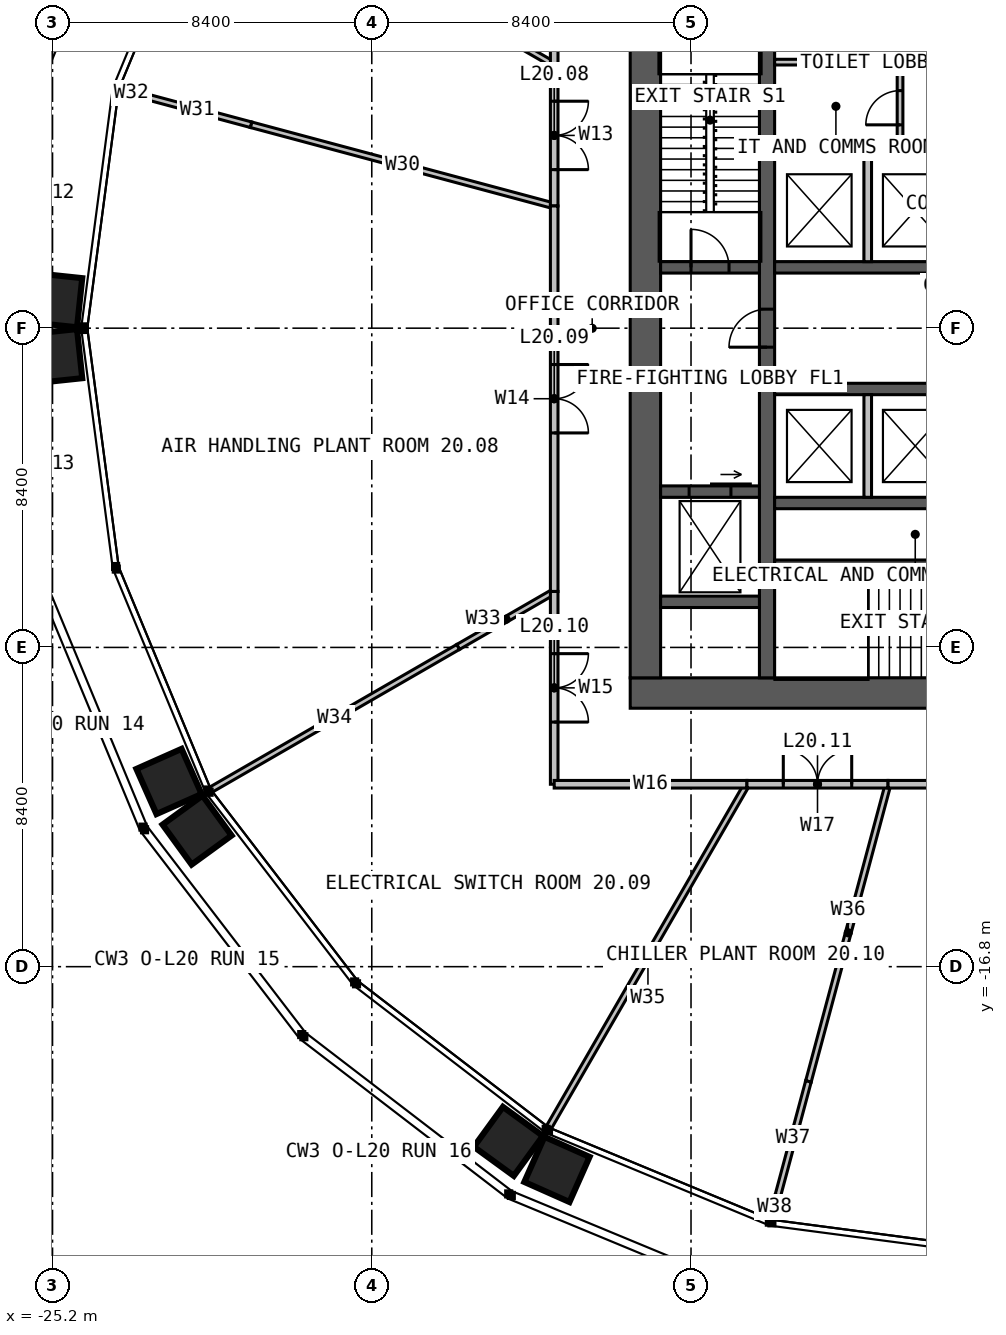
"""IFC4 building model, lengths in metres.
Left out: names, types, materials, properties, quantities, classifications, styles, units other than length and angle.
Written with IfcOpenShell. Run it as: python <this file> out.ifc"""

import sys

from ifc_helpers import new_model, si_unit, direction, frame, frame_2d, origin, place, context, subcontext, project, spatial, rectangle, extrude, element, fill, save


model = new_model("IFC4")
c1 = context("Model", 3, precision=1e-05, world=origin(), true_north=direction((0.0, 1.0)))
c2 = subcontext(c1, "Body", "Model", "MODEL_VIEW")
j1 = project(units=[si_unit("LENGTHUNIT", "METRE"), si_unit("PLANEANGLEUNIT", "RADIAN")], contexts=[c1])
p1 = place(None, origin())
s1 = spatial("IfcSite", under=j1, at=p1, CompositionType="ELEMENT")
p2 = place(p1, origin())
s2 = spatial("IfcBuilding", under=s1, at=p2, CompositionType="ELEMENT")
p3 = place(p2, frame((0.0, 0.0, 85.0)))
s3 = spatial("IfcBuildingStorey", under=s2, at=p3, CompositionType="ELEMENT", Elevation=85.0)
p4 = place(p3, frame((10.0, -9.6, 0.0), z_axis=(0.0, 0.0, 1.0), x_axis=(-1.0, 0.0, 0.0)))
e1 = element("IfcWall", 1, at=p4, inside=s3, PredefinedType="SOLIDWALL", context=c2, shape_type="SweptSolid", body=[
    extrude(rectangle(XDim=20.0, YDim=0.8, at=frame_2d((10.0, 0.0))), origin(), (0.0, 0.0, 1.0), 5.0),
])
p5 = place(p4, frame((6.875, 0.0, 0.0)))
e2 = element("IfcOpeningElement", 2, at=p5, cuts=e1, PredefinedType="OPENING", context=c2, shape_type="SweptSolid", body=[
    extrude(rectangle(XDim=1.2, YDim=2.2, at=frame_2d((0.6, 1.1))), frame((0.0, 0.41, 0.0), z_axis=(0.0, -1.0, 0.0), x_axis=(1.0, 0.0, 0.0)), (0.0, 0.0, 1.0), 0.82),
])
p6 = place(p3, frame((-9.6, 9.2, 0.0), z_axis=(0.0, 0.0, 1.0), x_axis=(0.0, -1.0, 0.0)))
e3 = element("IfcWall", 3, at=p6, inside=s3, PredefinedType="SOLIDWALL", context=c2, shape_type="SweptSolid", body=[
    extrude(rectangle(XDim=18.4, YDim=0.8, at=frame_2d((9.2, 0.0))), origin(), (0.0, 0.0, 1.0), 5.0),
])
p7 = place(p3, frame((-6.4, -9.2, 0.0), z_axis=(0.0, 0.0, 1.0), x_axis=(0.0, 1.0, 0.0)))
e4 = element("IfcWall", 4, at=p7, inside=s3, PredefinedType="SOLIDWALL", context=c2, shape_type="SweptSolid", body=[
    extrude(rectangle(XDim=18.4, YDim=0.4, at=frame_2d((9.2, 0.0))), origin(), (0.0, 0.0, 1.0), 5.0),
])
p8 = place(p7, frame((8.7, 0.0, 0.0)))
e5 = element("IfcOpeningElement", 5, at=p8, cuts=e4, PredefinedType="OPENING", context=c2, shape_type="SweptSolid", body=[
    extrude(rectangle(XDim=1.0, YDim=2.2, at=frame_2d((0.5, 1.1))), frame((0.0, 0.21, 0.0), z_axis=(0.0, -1.0, 0.0), x_axis=(1.0, 0.0, 0.0)), (0.0, 0.0, 1.0), 0.42),
])
for number, where, z_axis, x_axis in (
    (6, (-6.2, 1.6, 0.0), (0.0, 0.0, 1.0), (1.0, 0.0, 0.0)),
    (7, (-6.2, 4.6, 0.0), (0.0, 0.0, 1.0), (1.0, 0.0, 0.0)),
):
    element("IfcWall", number, at=place(p3, frame(where, z_axis=z_axis, x_axis=x_axis)), inside=s3, PredefinedType="SOLIDWALL", context=c2, shape_type="SweptSolid", body=[
        extrude(rectangle(XDim=4.85, YDim=0.3, at=frame_2d((2.425, 0.0))), origin(), (0.0, 0.0, 1.0), 5.0),
    ])
for number, where, z_axis, x_axis in (
    (8, (-6.2, -1.6, 0.0), (0.0, 0.0, 1.0), (1.0, 0.0, 0.0)),
    (9, (-6.2, -4.6, 0.0), (0.0, 0.0, 1.0), (1.0, 0.0, 0.0)),
):
    element("IfcWall", number, at=place(p3, frame(where, z_axis=z_axis, x_axis=x_axis)), inside=s3, PredefinedType="SOLIDWALL", context=c2, shape_type="SweptSolid", body=[
        extrude(rectangle(XDim=7.4, YDim=0.3, at=frame_2d((3.7, 0.0))), origin(), (0.0, 0.0, 1.0), 5.0),
    ])
p9 = place(p3, frame((-6.2, -6.2, 0.0), z_axis=(0.0, 0.0, 1.0), x_axis=(1.0, 0.0, 0.0)))
e10 = element("IfcWall", 10, at=p9, inside=s3, PredefinedType="SOLIDWALL", context=c2, shape_type="SweptSolid", body=[
    extrude(rectangle(XDim=7.4, YDim=0.2, at=frame_2d((3.7, 0.0))), origin(), (0.0, 0.0, 1.0), 5.0),
])
p10 = place(p3, frame((-9.2, 1.6, 0.0), z_axis=(0.0, 0.0, 1.0), x_axis=(1.0, 0.0, 0.0)))
e11 = element("IfcWall", 11, at=p10, inside=s3, PredefinedType="SOLIDWALL", context=c2, shape_type="SweptSolid", body=[
    extrude(rectangle(XDim=2.6, YDim=0.3, at=frame_2d((1.3, 0.0))), origin(), (0.0, 0.0, 1.0), 5.0),
])
p11 = place(p10, frame((0.8, 0.0, 0.0)))
e12 = element("IfcOpeningElement", 12, at=p11, cuts=e11, PredefinedType="OPENING", context=c2, shape_type="SweptSolid", body=[
    extrude(rectangle(XDim=1.0, YDim=2.2, at=frame_2d((0.5, 1.1))), frame((0.0, 0.16, 0.0), z_axis=(0.0, -1.0, 0.0), x_axis=(1.0, 0.0, 0.0)), (0.0, 0.0, 1.0), 0.32),
])
p12 = place(p3, frame((-9.2, -4.3, 0.0), z_axis=(0.0, 0.0, 1.0), x_axis=(1.0, 0.0, 0.0)))
e13 = element("IfcWall", 13, at=p12, inside=s3, PredefinedType="SOLIDWALL", context=c2, shape_type="SweptSolid", body=[
    extrude(rectangle(XDim=2.6, YDim=0.3, at=frame_2d((1.3, 0.0))), origin(), (0.0, 0.0, 1.0), 5.0),
])
p13 = place(p12, frame((0.75, 0.0, 0.0)))
e14 = element("IfcOpeningElement", 14, at=p13, cuts=e13, PredefinedType="OPENING", context=c2, shape_type="SweptSolid", body=[
    extrude(rectangle(XDim=1.1, YDim=2.2, at=frame_2d((0.55, 1.1))), frame((0.0, 0.16, 0.0), z_axis=(0.0, -1.0, 0.0), x_axis=(1.0, 0.0, 0.0)), (0.0, 0.0, 1.0), 0.32),
])
p14 = place(p3, frame((-9.2, -7.2, 0.0), z_axis=(0.0, 0.0, 1.0), x_axis=(1.0, 0.0, 0.0)))
e15 = element("IfcWall", 15, at=p14, inside=s3, PredefinedType="SOLIDWALL", context=c2, shape_type="SweptSolid", body=[
    extrude(rectangle(XDim=2.6, YDim=0.3, at=frame_2d((1.3, 0.0))), origin(), (0.0, 0.0, 1.0), 5.0),
])
for number, where, z_axis, x_axis in (
    (16, (-3.75, 1.75, 0.0), (0.0, 0.0, 1.0), (0.0, 1.0, 0.0)),
    (17, (-3.75, -1.75, 0.0), (0.0, 0.0, 1.0), (0.0, -1.0, 0.0)),
):
    element("IfcWall", number, at=place(p3, frame(where, z_axis=z_axis, x_axis=x_axis)), inside=s3, PredefinedType="SOLIDWALL", context=c2, shape_type="SweptSolid", body=[
        extrude(rectangle(XDim=2.7, YDim=0.2, at=frame_2d((1.35, 0.0))), origin(), (0.0, 0.0, 1.0), 4.75),
    ])
p15 = place(p3, frame((-2.9, 4.75, 0.0), z_axis=(0.0, 0.0, 1.0), x_axis=(0.0, 1.0, 0.0)))
e18 = element("IfcWall", 18, at=p15, inside=s3, PredefinedType="PARTITIONING", context=c2, shape_type="SweptSolid", body=[
    extrude(rectangle(XDim=4.45, YDim=0.15, at=frame_2d((2.225, 0.0))), origin(), (0.0, 0.0, 1.0), 4.75),
])
p16 = place(p15, frame((2.95, 0.0, 0.0)))
e19 = element("IfcOpeningElement", 19, at=p16, cuts=e18, PredefinedType="OPENING", context=c2, shape_type="SweptSolid", body=[
    extrude(rectangle(XDim=1.0, YDim=2.2, at=frame_2d((0.5, 1.1))), frame((0.0, 0.085, 0.0), z_axis=(0.0, -1.0, 0.0), x_axis=(1.0, 0.0, 0.0)), (0.0, 0.0, 1.0), 0.17),
])
p17 = place(p15, frame((0.6, 0.0, 0.0)))
e20 = element("IfcOpeningElement", 20, at=p17, cuts=e18, PredefinedType="OPENING", context=c2, shape_type="SweptSolid", body=[
    extrude(rectangle(XDim=0.9, YDim=2.2, at=frame_2d((0.45, 1.1))), frame((0.0, 0.085, 0.0), z_axis=(0.0, -1.0, 0.0), x_axis=(1.0, 0.0, 0.0)), (0.0, 0.0, 1.0), 0.17),
])
p18 = place(p3, frame((-6.2, 7.0, 0.0), z_axis=(0.0, 0.0, 1.0), x_axis=(1.0, 0.0, 0.0)))
e21 = element("IfcWall", 21, at=p18, inside=s3, PredefinedType="PARTITIONING", context=c2, shape_type="SweptSolid", body=[
    extrude(rectangle(XDim=3.225, YDim=0.15, at=frame_2d((1.612, 0.0))), origin(), (0.0, 0.0, 1.0), 4.75),
])
p19 = place(p3, frame((-12.0, 6.928, 0.0), z_axis=(0.0, 0.0, 1.0), x_axis=(-0.866026830048, 0.499997529631, 0.0)))
e22 = element("IfcWall", 22, at=p19, inside=s3, PredefinedType="PARTITIONING", context=c2, shape_type="SweptSolid", body=[
    extrude(rectangle(XDim=2.919, YDim=0.15, at=frame_2d((1.46, 0.0))), origin(), (0.0, 0.0, 1.0), 3.79),
])
p20 = place(p3, frame((-12.0, 3.215, 0.0), z_axis=(0.0, 0.0, 1.0), x_axis=(-0.965926149295, 0.258817839624, 0.0)))
e23 = element("IfcWall", 23, at=p20, inside=s3, PredefinedType="PARTITIONING", context=c2, shape_type="SweptSolid", body=[
    extrude(rectangle(XDim=8.26, YDim=0.15, at=frame_2d((4.13, 0.0))), origin(), (0.0, 0.0, 1.0), 4.8),
])
p21 = place(p3, frame((-19.978, 5.353, 0.0), z_axis=(0.0, 0.0, 1.0), x_axis=(-0.965910471853, 0.258876341839, 0.0)))
e24 = element("IfcWall", 24, at=p21, inside=s3, PredefinedType="PARTITIONING", context=c2, shape_type="SweptSolid", body=[
    extrude(rectangle(XDim=2.929, YDim=0.15, at=frame_2d((1.465, 0.0))), origin(), (0.0, 0.0, 1.0), 3.79),
])
p22 = place(p3, frame((-22.807, 6.111, 0.0), z_axis=(0.0, 0.0, 1.0), x_axis=(-0.965934907189, 0.258785152345, 0.0)))
e25 = element("IfcWall", 25, at=p22, inside=s3, PredefinedType="PARTITIONING", context=c2, shape_type="SweptSolid", body=[
    extrude(rectangle(XDim=0.663, YDim=0.15, at=frame_2d((0.332, 0.0))), origin(), (0.0, 0.0, 1.0), 4.8),
])
p23 = place(p3, frame((-12.0, -6.928, 0.0), z_axis=(0.0, 0.0, 1.0), x_axis=(-0.866026830048, -0.499997529631, 0.0)))
e26 = element("IfcWall", 26, at=p23, inside=s3, PredefinedType="PARTITIONING", context=c2, shape_type="SweptSolid", body=[
    extrude(rectangle(XDim=2.919, YDim=0.15, at=frame_2d((1.46, 0.0))), origin(), (0.0, 0.0, 1.0), 3.79),
])
p24 = place(p3, frame((-14.528, -8.388, 0.0), z_axis=(0.0, 0.0, 1.0), x_axis=(-0.8660207781, -0.500008011835, 0.0)))
e27 = element("IfcWall", 27, at=p24, inside=s3, PredefinedType="PARTITIONING", context=c2, shape_type="SweptSolid", body=[
    extrude(rectangle(XDim=7.5, YDim=0.15, at=frame_2d((3.75, 0.0))), origin(), (0.0, 0.0, 1.0), 4.8),
])
p25 = place(p3, frame((-6.928, -12.0, 0.0), z_axis=(0.0, 0.0, 1.0), x_axis=(-0.500005074639, -0.86602247392, 0.0)))
e28 = element("IfcWall", 28, at=p25, inside=s3, PredefinedType="PARTITIONING", context=c2, shape_type="SweptSolid", body=[
    extrude(rectangle(XDim=10.419, YDim=0.15, at=frame_2d((5.209, 0.0))), origin(), (0.0, 0.0, 1.0), 4.8),
])
p26 = place(p3, frame((-3.215, -12.0, 0.0), z_axis=(0.0, 0.0, 1.0), x_axis=(-0.258830053586, -0.965922876508, 0.0)))
e29 = element("IfcWall", 29, at=p26, inside=s3, PredefinedType="PARTITIONING", context=c2, shape_type="SweptSolid", body=[
    extrude(rectangle(XDim=8.095, YDim=0.15, at=frame_2d((4.047, 0.0))), origin(), (0.0, 0.0, 1.0), 4.8),
])
p27 = place(p3, frame((-5.311, -19.819, 0.0), z_axis=(0.0, 0.0, 1.0), x_axis=(-0.258835525839, -0.965921410138, 0.0)))
e30 = element("IfcWall", 30, at=p27, inside=s3, PredefinedType="PARTITIONING", context=c2, shape_type="SweptSolid", body=[
    extrude(rectangle(XDim=3.109, YDim=0.15, at=frame_2d((1.554, 0.0))), origin(), (0.0, 0.0, 1.0), 3.79),
])
p28 = place(p3, frame((-6.115, -22.822, 0.0), z_axis=(0.0, 0.0, 1.0), x_axis=(-0.258811407408, -0.965927872771, 0.0)))
e31 = element("IfcWall", 31, at=p28, inside=s3, PredefinedType="PARTITIONING", context=c2, shape_type="SweptSolid", body=[
    extrude(rectangle(XDim=0.648, YDim=0.15, at=frame_2d((0.324, 0.0))), origin(), (0.0, 0.0, 1.0), 4.8),
])
p29 = place(p3, frame((-12.0, 12.0, 0.0), z_axis=(0.0, 0.0, 1.0), x_axis=(0.0, -1.0, 0.0)))
e32 = element("IfcWall", 32, at=p29, inside=s3, PredefinedType="PARTITIONING", context=c2, shape_type="SweptSolid", body=[
    extrude(rectangle(XDim=5.072, YDim=0.2, at=frame_2d((2.536, 0.0))), origin(), (0.0, 0.0, 1.0), 4.8),
])
p30 = place(p3, frame((-12.0, 6.928, 0.0), z_axis=(0.0, 0.0, 1.0), x_axis=(0.0, -1.0, 0.0)))
e33 = element("IfcWall", 33, at=p30, inside=s3, PredefinedType="PARTITIONING", context=c2, shape_type="SweptSolid", body=[
    extrude(rectangle(XDim=3.713, YDim=0.2, at=frame_2d((1.856, 0.0))), origin(), (0.0, 0.0, 1.0), 4.8),
])
p31 = place(p30, frame((0.956, 0.0, 0.0)))
e34 = element("IfcOpeningElement", 34, at=p31, cuts=e33, PredefinedType="OPENING", context=c2, shape_type="SweptSolid", body=[
    extrude(rectangle(XDim=1.8, YDim=2.2, at=frame_2d((0.9, 1.1))), frame((0.0, 0.11, 0.0), z_axis=(0.0, -1.0, 0.0), x_axis=(1.0, 0.0, 0.0)), (0.0, 0.0, 1.0), 0.22),
])
p32 = place(p3, frame((-12.0, 3.215, 0.0), z_axis=(0.0, 0.0, 1.0), x_axis=(0.0, -1.0, 0.0)))
e35 = element("IfcWall", 35, at=p32, inside=s3, PredefinedType="PARTITIONING", context=c2, shape_type="SweptSolid", body=[
    extrude(rectangle(XDim=10.144, YDim=0.2, at=frame_2d((5.072, 0.0))), origin(), (0.0, 0.0, 1.0), 4.8),
])
p33 = place(p32, frame((4.172, 0.0, 0.0)))
e36 = element("IfcOpeningElement", 36, at=p33, cuts=e35, PredefinedType="OPENING", context=c2, shape_type="SweptSolid", body=[
    extrude(rectangle(XDim=1.8, YDim=2.2, at=frame_2d((0.9, 1.1))), frame((0.0, 0.11, 0.0), z_axis=(0.0, -1.0, 0.0), x_axis=(1.0, 0.0, 0.0)), (0.0, 0.0, 1.0), 0.22),
])
p34 = place(p3, frame((-12.0, -6.928, 0.0), z_axis=(0.0, 0.0, 1.0), x_axis=(0.0, -1.0, 0.0)))
e37 = element("IfcWall", 37, at=p34, inside=s3, PredefinedType="PARTITIONING", context=c2, shape_type="SweptSolid", body=[
    extrude(rectangle(XDim=5.072, YDim=0.2, at=frame_2d((2.536, 0.0))), origin(), (0.0, 0.0, 1.0), 4.8),
])
p35 = place(p34, frame((1.636, 0.0, 0.0)))
e38 = element("IfcOpeningElement", 38, at=p35, cuts=e37, PredefinedType="OPENING", context=c2, shape_type="SweptSolid", body=[
    extrude(rectangle(XDim=1.8, YDim=2.2, at=frame_2d((0.9, 1.1))), frame((0.0, 0.11, 0.0), z_axis=(0.0, -1.0, 0.0), x_axis=(1.0, 0.0, 0.0)), (0.0, 0.0, 1.0), 0.22),
])
p36 = place(p3, frame((-12.0, -12.0, 0.0), z_axis=(0.0, 0.0, 1.0), x_axis=(1.0, 0.0, 0.0)))
e39 = element("IfcWall", 39, at=p36, inside=s3, PredefinedType="PARTITIONING", context=c2, shape_type="SweptSolid", body=[
    extrude(rectangle(XDim=5.072, YDim=0.2, at=frame_2d((2.536, 0.0))), origin(), (0.0, 0.0, 1.0), 4.8),
])
p37 = place(p3, frame((-6.928, -12.0, 0.0), z_axis=(0.0, 0.0, 1.0), x_axis=(1.0, 0.0, 0.0)))
e40 = element("IfcWall", 40, at=p37, inside=s3, PredefinedType="PARTITIONING", context=c2, shape_type="SweptSolid", body=[
    extrude(rectangle(XDim=3.713, YDim=0.2, at=frame_2d((1.856, 0.0))), origin(), (0.0, 0.0, 1.0), 4.8),
])
p38 = place(p37, frame((0.956, 0.0, 0.0)))
e41 = element("IfcOpeningElement", 41, at=p38, cuts=e40, PredefinedType="OPENING", context=c2, shape_type="SweptSolid", body=[
    extrude(rectangle(XDim=1.8, YDim=2.2, at=frame_2d((0.9, 1.1))), frame((0.0, 0.11, 0.0), z_axis=(0.0, -1.0, 0.0), x_axis=(1.0, 0.0, 0.0)), (0.0, 0.0, 1.0), 0.22),
])
p39 = place(p3, frame((-3.215, -12.0, 0.0), z_axis=(0.0, 0.0, 1.0), x_axis=(1.0, 0.0, 0.0)))
e42 = element("IfcWall", 42, at=p39, inside=s3, PredefinedType="PARTITIONING", context=c2, shape_type="SweptSolid", body=[
    extrude(rectangle(XDim=10.144, YDim=0.2, at=frame_2d((5.072, 0.0))), origin(), (0.0, 0.0, 1.0), 4.8),
])
p40 = place(p39, frame((4.172, 0.0, 0.0)))
e43 = element("IfcOpeningElement", 43, at=p40, cuts=e42, PredefinedType="OPENING", context=c2, shape_type="SweptSolid", body=[
    extrude(rectangle(XDim=1.8, YDim=2.2, at=frame_2d((0.9, 1.1))), frame((0.0, 0.11, 0.0), z_axis=(0.0, -1.0, 0.0), x_axis=(1.0, 0.0, 0.0)), (0.0, 0.0, 1.0), 0.22),
])
p41 = place(p8, origin())
e44 = element("IfcDoor", 44, at=p41, inside=s3, OperationType="SINGLE_SWING_LEFT", PredefinedType="DOOR", context=c2, shape_type="SweptSolid", body=[
    extrude(rectangle(XDim=1.0, YDim=2.2, at=frame_2d((0.5, 1.1))), frame((0.0, 0.025, 0.0), z_axis=(0.0, -1.0, 0.0), x_axis=(1.0, 0.0, 0.0)), (0.0, 0.0, 1.0), 0.05),
])
fill(e5, e44)
p42 = place(p11, origin())
e45 = element("IfcDoor", 45, at=p42, inside=s3, OperationType="SINGLE_SWING_LEFT", PredefinedType="DOOR", context=c2, shape_type="SweptSolid", body=[
    extrude(rectangle(XDim=1.0, YDim=2.2, at=frame_2d((0.5, 1.1))), frame((0.0, 0.025, 0.0), z_axis=(0.0, -1.0, 0.0), x_axis=(1.0, 0.0, 0.0)), (0.0, 0.0, 1.0), 0.05),
])
fill(e12, e45)
p43 = place(p17, origin())
e46 = element("IfcDoor", 46, at=p43, inside=s3, OperationType="SINGLE_SWING_LEFT", PredefinedType="DOOR", context=c2, shape_type="SweptSolid", body=[
    extrude(rectangle(XDim=0.9, YDim=2.2, at=frame_2d((0.45, 1.1))), frame((0.0, 0.025, 0.0), z_axis=(0.0, -1.0, 0.0), x_axis=(1.0, 0.0, 0.0)), (0.0, 0.0, 1.0), 0.05),
])
fill(e20, e46)
p44 = place(p13, origin())
e47 = element("IfcDoor", 47, at=p44, inside=s3, OperationType="SLIDING_TO_LEFT", PredefinedType="DOOR", context=c2, shape_type="SweptSolid", body=[
    extrude(rectangle(XDim=1.1, YDim=2.2, at=frame_2d((0.55, 1.1))), frame((0.0, 0.025, 0.0), z_axis=(0.0, -1.0, 0.0), x_axis=(1.0, 0.0, 0.0)), (0.0, 0.0, 1.0), 0.05),
])
fill(e14, e47)
p45 = place(p31, origin())
e48 = element("IfcDoor", 48, at=p45, inside=s3, OperationType="DOUBLE_DOOR_SINGLE_SWING", PredefinedType="DOOR", context=c2, shape_type="SweptSolid", body=[
    extrude(rectangle(XDim=1.8, YDim=2.2, at=frame_2d((0.9, 1.1))), frame((0.0, 0.025, 0.0), z_axis=(0.0, -1.0, 0.0), x_axis=(1.0, 0.0, 0.0)), (0.0, 0.0, 1.0), 0.05),
])
fill(e34, e48)
p46 = place(p33, origin())
e49 = element("IfcDoor", 49, at=p46, inside=s3, OperationType="DOUBLE_DOOR_SINGLE_SWING", PredefinedType="DOOR", context=c2, shape_type="SweptSolid", body=[
    extrude(rectangle(XDim=1.8, YDim=2.2, at=frame_2d((0.9, 1.1))), frame((0.0, 0.025, 0.0), z_axis=(0.0, -1.0, 0.0), x_axis=(1.0, 0.0, 0.0)), (0.0, 0.0, 1.0), 0.05),
])
fill(e36, e49)
p47 = place(p35, origin())
e50 = element("IfcDoor", 50, at=p47, inside=s3, OperationType="DOUBLE_DOOR_SINGLE_SWING", PredefinedType="DOOR", context=c2, shape_type="SweptSolid", body=[
    extrude(rectangle(XDim=1.8, YDim=2.2, at=frame_2d((0.9, 1.1))), frame((0.0, 0.025, 0.0), z_axis=(0.0, -1.0, 0.0), x_axis=(1.0, 0.0, 0.0)), (0.0, 0.0, 1.0), 0.05),
])
fill(e38, e50)
p48 = place(p38, origin())
e51 = element("IfcDoor", 51, at=p48, inside=s3, OperationType="DOUBLE_DOOR_SINGLE_SWING", PredefinedType="DOOR", context=c2, shape_type="SweptSolid", body=[
    extrude(rectangle(XDim=1.8, YDim=2.2, at=frame_2d((0.9, 1.1))), frame((0.0, 0.025, 0.0), z_axis=(0.0, -1.0, 0.0), x_axis=(1.0, 0.0, 0.0)), (0.0, 0.0, 1.0), 0.05),
])
fill(e41, e51)
save(model, sys.argv[1])
